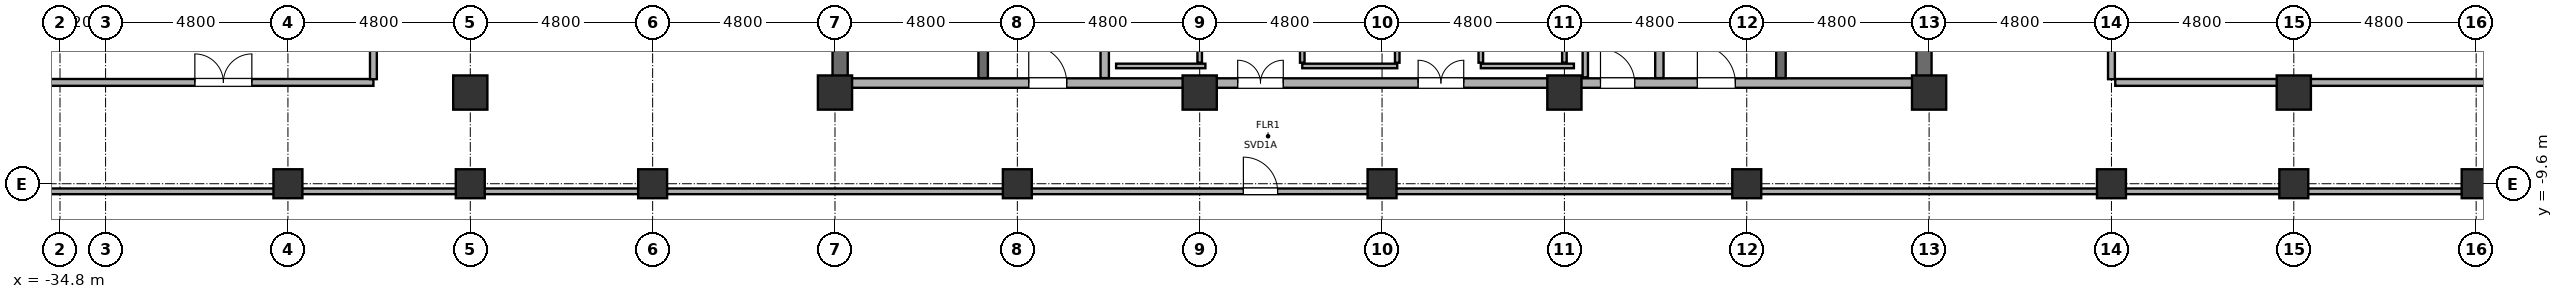
"""IFC4 building model, lengths in metres.
Left out: names, types, materials, properties, quantities, classifications, styles, units other than length and angle.
Written with IfcOpenShell. Run it as: python <this file> out.ifc"""

import sys

from ifc_helpers import new_model, si_unit, direction, frame, frame_2d, origin, origin_2d, place, context, subcontext, project, spatial, rectangle, hollow_rectangle, hollow_circle, extrude, element, fill, save


model = new_model("IFC4")
c1 = context("Model", 3, precision=1e-05, world=origin(), true_north=direction((0.0, 1.0)))
c2 = subcontext(c1, "Body", "Model", "MODEL_VIEW")
j1 = project(units=[si_unit("LENGTHUNIT", "METRE"), si_unit("PLANEANGLEUNIT", "RADIAN")], contexts=[c1])
p1 = place(None, origin())
s1 = spatial("IfcSite", under=j1, at=p1, CompositionType="ELEMENT")
p2 = place(p1, origin())
s2 = spatial("IfcBuilding", under=s1, at=p2, CompositionType="ELEMENT")
p3 = place(p2, frame((0.0, 0.0, -10.2)))
s3 = spatial("IfcBuildingStorey", under=s2, at=p3, CompositionType="ELEMENT", Elevation=-10.2)
for number, where, z_axis, x_axis in (
    (1, (-28.8, -9.6, -0.25), (0.0, 0.0, 1.0), (1.0, 0.0, 0.0)),
    (2, (-24.0, -9.6, -0.25), (0.0, 0.0, 1.0), (1.0, 0.0, 0.0)),
):
    element("IfcColumn", number, at=place(p3, frame(where, z_axis=z_axis, x_axis=x_axis)), inside=s3, PredefinedType="COLUMN", context=c2, shape_type="SweptSolid", body=[
        extrude(hollow_circle(Radius=0.381, WallThickness=0.032, at=origin_2d()), origin(), (0.0, 0.0, 1.0), 5.05),
    ])
p4 = place(p3, frame((-24.0, -7.2, -0.25), z_axis=(0.0, 0.0, 1.0), x_axis=(1.0, 0.0, 0.0)))
e3 = element("IfcColumn", 3, at=p4, inside=s3, PredefinedType="COLUMN", context=c2, shape_type="SweptSolid", body=[
    extrude(hollow_rectangle(XDim=0.9, YDim=0.9, WallThickness=0.04, at=origin_2d()), origin(), (0.0, 0.0, 1.0), 5.05),
])
p5 = place(p3, frame((-19.2, -9.6, -0.25), z_axis=(0.0, 0.0, 1.0), x_axis=(1.0, 0.0, 0.0)))
e4 = element("IfcColumn", 4, at=p5, inside=s3, PredefinedType="COLUMN", context=c2, shape_type="SweptSolid", body=[
    extrude(hollow_circle(Radius=0.381, WallThickness=0.032, at=origin_2d()), origin(), (0.0, 0.0, 1.0), 5.05),
])
p6 = place(p3, frame((-14.4, -7.2, -0.25), z_axis=(0.0, 0.0, 1.0), x_axis=(1.0, 0.0, 0.0)))
e5 = element("IfcColumn", 5, at=p6, inside=s3, PredefinedType="COLUMN", context=c2, shape_type="SweptSolid", body=[
    extrude(hollow_rectangle(XDim=0.9, YDim=0.9, WallThickness=0.04, at=origin_2d()), origin(), (0.0, 0.0, 1.0), 5.05),
])
p7 = place(p3, frame((-9.6, -9.6, -0.25), z_axis=(0.0, 0.0, 1.0), x_axis=(1.0, 0.0, 0.0)))
e6 = element("IfcColumn", 6, at=p7, inside=s3, PredefinedType="COLUMN", context=c2, shape_type="SweptSolid", body=[
    extrude(hollow_circle(Radius=0.381, WallThickness=0.032, at=origin_2d()), origin(), (0.0, 0.0, 1.0), 5.05),
])
p8 = place(p3, frame((-4.8, -7.2, -0.25), z_axis=(0.0, 0.0, 1.0), x_axis=(1.0, 0.0, 0.0)))
e7 = element("IfcColumn", 7, at=p8, inside=s3, PredefinedType="COLUMN", context=c2, shape_type="SweptSolid", body=[
    extrude(hollow_rectangle(XDim=0.9, YDim=0.9, WallThickness=0.04, at=origin_2d()), origin(), (0.0, 0.0, 1.0), 5.05),
])
p9 = place(p3, frame((0.0, -9.6, -0.25), z_axis=(0.0, 0.0, 1.0), x_axis=(1.0, 0.0, 0.0)))
e8 = element("IfcColumn", 8, at=p9, inside=s3, PredefinedType="COLUMN", context=c2, shape_type="SweptSolid", body=[
    extrude(hollow_circle(Radius=0.381, WallThickness=0.032, at=origin_2d()), origin(), (0.0, 0.0, 1.0), 5.05),
])
p10 = place(p3, frame((4.8, -7.2, -0.25), z_axis=(0.0, 0.0, 1.0), x_axis=(1.0, 0.0, 0.0)))
e9 = element("IfcColumn", 9, at=p10, inside=s3, PredefinedType="COLUMN", context=c2, shape_type="SweptSolid", body=[
    extrude(hollow_rectangle(XDim=0.9, YDim=0.9, WallThickness=0.04, at=origin_2d()), origin(), (0.0, 0.0, 1.0), 5.05),
])
p11 = place(p3, frame((9.6, -9.6, -0.25), z_axis=(0.0, 0.0, 1.0), x_axis=(1.0, 0.0, 0.0)))
e10 = element("IfcColumn", 10, at=p11, inside=s3, PredefinedType="COLUMN", context=c2, shape_type="SweptSolid", body=[
    extrude(hollow_circle(Radius=0.381, WallThickness=0.032, at=origin_2d()), origin(), (0.0, 0.0, 1.0), 5.05),
])
p12 = place(p3, frame((14.4, -7.2, -0.25), z_axis=(0.0, 0.0, 1.0), x_axis=(1.0, 0.0, 0.0)))
e11 = element("IfcColumn", 11, at=p12, inside=s3, PredefinedType="COLUMN", context=c2, shape_type="SweptSolid", body=[
    extrude(hollow_rectangle(XDim=0.9, YDim=0.9, WallThickness=0.04, at=origin_2d()), origin(), (0.0, 0.0, 1.0), 5.05),
])
for number, where, z_axis, x_axis in (
    (12, (19.2, -9.6, -0.25), (0.0, 0.0, 1.0), (1.0, 0.0, 0.0)),
    (13, (24.0, -9.6, -0.25), (0.0, 0.0, 1.0), (1.0, 0.0, 0.0)),
):
    element("IfcColumn", number, at=place(p3, frame(where, z_axis=z_axis, x_axis=x_axis)), inside=s3, PredefinedType="COLUMN", context=c2, shape_type="SweptSolid", body=[
        extrude(hollow_circle(Radius=0.381, WallThickness=0.032, at=origin_2d()), origin(), (0.0, 0.0, 1.0), 5.05),
    ])
p13 = place(p3, frame((24.0, -7.2, -0.25), z_axis=(0.0, 0.0, 1.0), x_axis=(1.0, 0.0, 0.0)))
e14 = element("IfcColumn", 14, at=p13, inside=s3, PredefinedType="COLUMN", context=c2, shape_type="SweptSolid", body=[
    extrude(hollow_rectangle(XDim=0.9, YDim=0.9, WallThickness=0.04, at=origin_2d()), origin(), (0.0, 0.0, 1.0), 5.05),
])
p14 = place(p3, frame((28.8, -9.6, -0.25), z_axis=(0.0, 0.0, 1.0), x_axis=(1.0, 0.0, 0.0)))
e15 = element("IfcColumn", 15, at=p14, inside=s3, PredefinedType="COLUMN", context=c2, shape_type="SweptSolid", body=[
    extrude(hollow_circle(Radius=0.381, WallThickness=0.032, at=origin_2d()), origin(), (0.0, 0.0, 1.0), 5.05),
])
for number, where, z_axis, x_axis in (
    (16, (-14.265, -7.2, -0.25), (0.0, 0.0, 1.0), (0.0, 1.0, 0.0)),
    (17, (14.265, -7.2, -0.25), (0.0, 0.0, 1.0), (0.0, 1.0, 0.0)),
):
    element("IfcWall", number, at=place(p3, frame(where, z_axis=z_axis, x_axis=x_axis)), inside=s3, PredefinedType="SHEAR", context=c2, shape_type="SweptSolid", body=[
        extrude(rectangle(XDim=14.4, YDim=0.4, at=frame_2d((7.2, 0.0))), origin(), (0.0, 0.0, 1.0), 4.8),
    ])
p15 = place(p3, frame((-14.2, -6.95, 0.0), z_axis=(0.0, 0.0, 1.0), x_axis=(1.0, 0.0, 0.0)))
e18 = element("IfcWall", 18, at=p15, inside=s3, PredefinedType="SOLIDWALL", context=c2, shape_type="SweptSolid", body=[
    extrude(rectangle(XDim=9.4, YDim=0.25, at=frame_2d((4.7, 0.0))), origin(), (0.0, 0.0, 1.0), 3.55),
])
p16 = place(p15, frame((4.9, 0.0, 0.0)))
e19 = element("IfcOpeningElement", 19, at=p16, cuts=e18, PredefinedType="OPENING", context=c2, shape_type="SweptSolid", body=[
    extrude(rectangle(XDim=1.0, YDim=2.15, at=frame_2d((0.5, 1.075))), frame((0.0, 0.14, 0.0), z_axis=(0.0, -1.0, 0.0), x_axis=(1.0, 0.0, 0.0)), (0.0, 0.0, 1.0), 0.28),
])
p17 = place(p3, frame((-4.6, -6.95, 0.0), z_axis=(0.0, 0.0, 1.0), x_axis=(1.0, 0.0, 0.0)))
e20 = element("IfcWall", 20, at=p17, inside=s3, PredefinedType="SOLIDWALL", context=c2, shape_type="SweptSolid", body=[
    extrude(rectangle(XDim=9.2, YDim=0.25, at=frame_2d((4.6, 0.0))), origin(), (0.0, 0.0, 1.0), 3.35),
])
p18 = place(p17, frame((0.8, 0.0, 0.0)))
e21 = element("IfcOpeningElement", 21, at=p18, cuts=e20, PredefinedType="OPENING", context=c2, shape_type="SweptSolid", body=[
    extrude(rectangle(XDim=1.2, YDim=2.2, at=frame_2d((0.6, 1.1))), frame((0.0, 0.14, 0.0), z_axis=(0.0, -1.0, 0.0), x_axis=(1.0, 0.0, 0.0)), (0.0, 0.0, 1.0), 0.28),
])
p19 = place(p17, frame((5.55, 0.0, 0.0)))
e22 = element("IfcOpeningElement", 22, at=p19, cuts=e20, PredefinedType="OPENING", context=c2, shape_type="SweptSolid", body=[
    extrude(rectangle(XDim=1.2, YDim=2.2, at=frame_2d((0.6, 1.1))), frame((0.0, 0.14, 0.0), z_axis=(0.0, -1.0, 0.0), x_axis=(1.0, 0.0, 0.0)), (0.0, 0.0, 1.0), 0.28),
])
p20 = place(p3, frame((4.8, -6.95, 0.0), z_axis=(0.0, 0.0, 1.0), x_axis=(1.0, 0.0, 0.0)))
e23 = element("IfcWall", 23, at=p20, inside=s3, PredefinedType="SOLIDWALL", context=c2, shape_type="SweptSolid", body=[
    extrude(rectangle(XDim=9.4, YDim=0.25, at=frame_2d((4.7, 0.0))), origin(), (0.0, 0.0, 1.0), 3.55),
])
p21 = place(p20, frame((3.5, 0.0, 0.0)))
e24 = element("IfcOpeningElement", 24, at=p21, cuts=e23, PredefinedType="OPENING", context=c2, shape_type="SweptSolid", body=[
    extrude(rectangle(XDim=1.0, YDim=2.15, at=frame_2d((0.5, 1.075))), frame((0.0, 0.14, 0.0), z_axis=(0.0, -1.0, 0.0), x_axis=(1.0, 0.0, 0.0)), (0.0, 0.0, 1.0), 0.28),
])
p22 = place(p20, frame((0.95, 0.0, 0.0)))
e25 = element("IfcOpeningElement", 25, at=p22, cuts=e23, PredefinedType="OPENING", context=c2, shape_type="SweptSolid", body=[
    extrude(rectangle(XDim=0.9, YDim=2.1, at=frame_2d((0.45, 1.05))), frame((0.0, 0.14, 0.0), z_axis=(0.0, -1.0, 0.0), x_axis=(1.0, 0.0, 0.0)), (0.0, 0.0, 1.0), 0.28),
])
for number, where, z_axis, x_axis in (
    (26, (-7.3, -6.82, 0.0), (0.0, 0.0, 1.0), (0.0, 1.0, 0.0)),
    (27, (7.3, -6.82, 0.0), (0.0, 0.0, 1.0), (0.0, 1.0, 0.0)),
):
    element("IfcWall", number, at=place(p3, frame(where, z_axis=z_axis, x_axis=x_axis)), inside=s3, PredefinedType="SOLIDWALL", context=c2, shape_type="SweptSolid", body=[
        extrude(rectangle(XDim=3.67, YDim=0.22, at=frame_2d((1.835, 0.0))), origin(), (0.0, 0.0, 1.0), 3.55),
    ])
p23 = place(p3, frame((-10.5, -6.82, -0.25), z_axis=(0.0, 0.0, 1.0), x_axis=(0.0, 1.0, 0.0)))
e28 = element("IfcWall", 28, at=p23, inside=s3, PredefinedType="SOLIDWALL", context=c2, shape_type="SweptSolid", body=[
    extrude(rectangle(XDim=13.64, YDim=0.25, at=frame_2d((6.82, 0.0))), origin(), (0.0, 0.0, 1.0), 4.8),
])
p24 = place(p23, frame((2.32, 0.0, 0.25)))
e29 = element("IfcOpeningElement", 29, at=p24, cuts=e28, PredefinedType="OPENING", context=c2, shape_type="SweptSolid", body=[
    extrude(rectangle(XDim=0.95, YDim=2.15, at=frame_2d((0.475, 1.075))), frame((0.0, 0.14, 0.0), z_axis=(0.0, -1.0, 0.0), x_axis=(1.0, 0.0, 0.0)), (0.0, 0.0, 1.0), 0.28),
])
p25 = place(p3, frame((10.5, -6.82, -0.25), z_axis=(0.0, 0.0, 1.0), x_axis=(0.0, 1.0, 0.0)))
e30 = element("IfcWall", 30, at=p25, inside=s3, PredefinedType="SOLIDWALL", context=c2, shape_type="SweptSolid", body=[
    extrude(rectangle(XDim=13.64, YDim=0.25, at=frame_2d((6.82, 0.0))), origin(), (0.0, 0.0, 1.0), 4.8),
])
p26 = place(p25, frame((2.32, 0.0, 0.25)))
e31 = element("IfcOpeningElement", 31, at=p26, cuts=e30, PredefinedType="OPENING", context=c2, shape_type="SweptSolid", body=[
    extrude(rectangle(XDim=0.95, YDim=2.15, at=frame_2d((0.475, 1.075))), frame((0.0, 0.14, 0.0), z_axis=(0.0, -1.0, 0.0), x_axis=(1.0, 0.0, 0.0)), (0.0, 0.0, 1.0), 0.28),
])
p27 = place(p3, frame((-37.5, -9.8, 0.0), z_axis=(0.0, 0.0, 1.0), x_axis=(1.0, 0.0, 0.0)))
e32 = element("IfcWall", 32, at=p27, inside=s3, PredefinedType="PARTITIONING", context=c2, shape_type="SweptSolid", body=[
    extrude(rectangle(XDim=75.0, YDim=0.15, at=frame_2d((37.5, 0.0))), origin(), (0.0, 0.0, 1.0), 2.15),
])
p28 = place(p27, frame((33.85, 0.0, 0.0)))
e33 = element("IfcOpeningElement", 33, at=p28, cuts=e32, PredefinedType="OPENING", context=c2, shape_type="SweptSolid", body=[
    extrude(rectangle(XDim=0.9, YDim=2.02, at=frame_2d((0.45, 1.01))), frame((0.0, 0.09, 0.0), z_axis=(0.0, -1.0, 0.0), x_axis=(1.0, 0.0, 0.0)), (0.0, 0.0, 1.0), 0.18),
])
p29 = place(p3, frame((-37.5, -6.933, 0.0), z_axis=(0.0, 0.0, 1.0), x_axis=(1.0, 0.0, 0.0)))
e34 = element("IfcWall", 34, at=p29, inside=s3, PredefinedType="PARTITIONING", context=c2, shape_type="SweptSolid", body=[
    extrude(rectangle(XDim=10.95, YDim=0.18, at=frame_2d((5.475, 0.0))), origin(), (0.0, 0.0, 1.0), 3.85),
])
p30 = place(p29, frame((6.25, 0.0, 0.0)))
e35 = element("IfcOpeningElement", 35, at=p30, cuts=e34, PredefinedType="OPENING", context=c2, shape_type="SweptSolid", body=[
    extrude(rectangle(XDim=1.5, YDim=2.2, at=frame_2d((0.75, 1.1))), frame((0.0, 0.105, 0.0), z_axis=(0.0, -1.0, 0.0), x_axis=(1.0, 0.0, 0.0)), (0.0, 0.0, 1.0), 0.21),
])
p31 = place(p3, frame((19.3, -6.933, 0.0), z_axis=(0.0, 0.0, 1.0), x_axis=(1.0, 0.0, 0.0)))
e36 = element("IfcWall", 36, at=p31, inside=s3, PredefinedType="PARTITIONING", context=c2, shape_type="SweptSolid", body=[
    extrude(rectangle(XDim=18.2, YDim=0.18, at=frame_2d((9.1, 0.0))), origin(), (0.0, 0.0, 1.0), 3.55),
])
p32 = place(p3, frame((-7.0, -6.5, 0.0), z_axis=(0.0, 0.0, 1.0), x_axis=(1.0, 0.0, 0.0)))
e37 = element("IfcWall", 37, at=p32, inside=s3, PredefinedType="PARTITIONING", context=c2, shape_type="SweptSolid", body=[
    extrude(rectangle(XDim=2.35, YDim=0.12, at=frame_2d((1.175, 0.0))), origin(), (0.0, 0.0, 1.0), 4.55),
])
p33 = place(p3, frame((-2.1, -6.5, 0.0), z_axis=(0.0, 0.0, 1.0), x_axis=(1.0, 0.0, 0.0)))
e38 = element("IfcWall", 38, at=p33, inside=s3, PredefinedType="PARTITIONING", context=c2, shape_type="SweptSolid", body=[
    extrude(rectangle(XDim=2.5, YDim=0.12, at=frame_2d((1.25, 0.0))), origin(), (0.0, 0.0, 1.0), 4.55),
])
p34 = place(p3, frame((2.6, -6.5, 0.0), z_axis=(0.0, 0.0, 1.0), x_axis=(1.0, 0.0, 0.0)))
e39 = element("IfcWall", 39, at=p34, inside=s3, PredefinedType="PARTITIONING", context=c2, shape_type="SweptSolid", body=[
    extrude(rectangle(XDim=2.45, YDim=0.12, at=frame_2d((1.225, 0.0))), origin(), (0.0, 0.0, 1.0), 4.55),
])
p35 = place(p3, frame((-26.55, -6.848, 0.0), z_axis=(0.0, 0.0, 1.0), x_axis=(0.0, 1.0, 0.0)))
e40 = element("IfcWall", 40, at=p35, inside=s3, PredefinedType="PARTITIONING", context=c2, shape_type="SweptSolid", body=[
    extrude(rectangle(XDim=1.848, YDim=0.18, at=frame_2d((0.924, 0.0))), origin(), (0.0, 0.0, 1.0), 4.55),
])
p36 = place(p3, frame((-4.8, -6.415, 0.0), z_axis=(0.0, 0.0, 1.0), x_axis=(0.0, 1.0, 0.0)))
e41 = element("IfcWall", 41, at=p36, inside=s3, PredefinedType="PARTITIONING", context=c2, shape_type="SweptSolid", body=[
    extrude(rectangle(XDim=9.28, YDim=0.12, at=frame_2d((4.64, 0.0))), origin(), (0.0, 0.0, 1.0), 4.55),
])
p37 = place(p36, frame((3.965, 0.0, 0.0)))
e42 = element("IfcOpeningElement", 42, at=p37, cuts=e41, PredefinedType="OPENING", context=c2, shape_type="SweptSolid", body=[
    extrude(rectangle(XDim=0.9, YDim=2.1, at=frame_2d((0.45, 1.05))), frame((0.0, 0.075, 0.0), z_axis=(0.0, -1.0, 0.0), x_axis=(1.0, 0.0, 0.0)), (0.0, 0.0, 1.0), 0.15),
])
p38 = place(p3, frame((-2.1, -6.415, 0.0), z_axis=(0.0, 0.0, 1.0), x_axis=(0.0, 1.0, 0.0)))
e43 = element("IfcWall", 43, at=p38, inside=s3, PredefinedType="PARTITIONING", context=c2, shape_type="SweptSolid", body=[
    extrude(rectangle(XDim=9.165, YDim=0.12, at=frame_2d((4.583, 0.0))), origin(), (0.0, 0.0, 1.0), 4.55),
])
p39 = place(p38, frame((3.965, 0.0, 0.0)))
e44 = element("IfcOpeningElement", 44, at=p39, cuts=e43, PredefinedType="OPENING", context=c2, shape_type="SweptSolid", body=[
    extrude(rectangle(XDim=0.9, YDim=2.1, at=frame_2d((0.45, 1.05))), frame((0.0, 0.075, 0.0), z_axis=(0.0, -1.0, 0.0), x_axis=(1.0, 0.0, 0.0)), (0.0, 0.0, 1.0), 0.15),
])
p40 = place(p3, frame((0.4, -6.415, 0.0), z_axis=(0.0, 0.0, 1.0), x_axis=(0.0, 1.0, 0.0)))
e45 = element("IfcWall", 45, at=p40, inside=s3, PredefinedType="PARTITIONING", context=c2, shape_type="SweptSolid", body=[
    extrude(rectangle(XDim=9.165, YDim=0.12, at=frame_2d((4.583, 0.0))), origin(), (0.0, 0.0, 1.0), 4.55),
])
p41 = place(p3, frame((2.6, -6.415, 0.0), z_axis=(0.0, 0.0, 1.0), x_axis=(0.0, 1.0, 0.0)))
e46 = element("IfcWall", 46, at=p41, inside=s3, PredefinedType="PARTITIONING", context=c2, shape_type="SweptSolid", body=[
    extrude(rectangle(XDim=9.165, YDim=0.12, at=frame_2d((4.583, 0.0))), origin(), (0.0, 0.0, 1.0), 4.55),
])
p42 = place(p41, frame((1.465, 0.0, 0.0)))
e47 = element("IfcOpeningElement", 47, at=p42, cuts=e46, PredefinedType="OPENING", context=c2, shape_type="SweptSolid", body=[
    extrude(rectangle(XDim=0.9, YDim=2.1, at=frame_2d((0.45, 1.05))), frame((0.0, 0.075, 0.0), z_axis=(0.0, -1.0, 0.0), x_axis=(1.0, 0.0, 0.0)), (0.0, 0.0, 1.0), 0.15),
])
p43 = place(p41, frame((6.465, 0.0, 0.0)))
e48 = element("IfcOpeningElement", 48, at=p43, cuts=e46, PredefinedType="OPENING", context=c2, shape_type="SweptSolid", body=[
    extrude(rectangle(XDim=0.9, YDim=2.1, at=frame_2d((0.45, 1.05))), frame((0.0, 0.075, 0.0), z_axis=(0.0, -1.0, 0.0), x_axis=(1.0, 0.0, 0.0)), (0.0, 0.0, 1.0), 0.15),
])
p44 = place(p3, frame((4.8, -6.415, 0.0), z_axis=(0.0, 0.0, 1.0), x_axis=(0.0, 1.0, 0.0)))
e49 = element("IfcWall", 49, at=p44, inside=s3, PredefinedType="PARTITIONING", context=c2, shape_type="SweptSolid", body=[
    extrude(rectangle(XDim=9.165, YDim=0.12, at=frame_2d((4.583, 0.0))), origin(), (0.0, 0.0, 1.0), 4.55),
])
p45 = place(p3, frame((5.35, -6.8, 0.0), z_axis=(0.0, 0.0, 1.0), x_axis=(0.0, 1.0, 0.0)))
e50 = element("IfcWall", 50, at=p45, inside=s3, PredefinedType="PLUMBINGWALL", context=c2, shape_type="SweptSolid", body=[
    extrude(rectangle(XDim=2.315, YDim=0.14, at=frame_2d((1.157, 0.0))), origin(), (0.0, 0.0, 1.0), 3.55),
])
p46 = place(p3, frame((19.2, -6.848, 0.0), z_axis=(0.0, 0.0, 1.0), x_axis=(0.0, 1.0, 0.0)))
e51 = element("IfcWall", 51, at=p46, inside=s3, PredefinedType="PARTITIONING", context=c2, shape_type="SweptSolid", body=[
    extrude(rectangle(XDim=13.763, YDim=0.18, at=frame_2d((6.882, 0.0))), origin(), (0.0, 0.0, 1.0), 3.55),
])
p47 = place(p16, origin())
e52 = element("IfcDoor", 52, at=p47, inside=s3, OperationType="SINGLE_SWING_RIGHT", PredefinedType="DOOR", context=c2, shape_type="SweptSolid", body=[
    extrude(rectangle(XDim=1.0, YDim=2.15, at=frame_2d((0.5, 1.075))), frame((0.0, 0.025, 0.0), z_axis=(0.0, -1.0, 0.0), x_axis=(1.0, 0.0, 0.0)), (0.0, 0.0, 1.0), 0.05),
])
fill(e19, e52)
p48 = place(p21, origin())
e53 = element("IfcDoor", 53, at=p48, inside=s3, OperationType="SINGLE_SWING_LEFT", PredefinedType="DOOR", context=c2, shape_type="SweptSolid", body=[
    extrude(rectangle(XDim=1.0, YDim=2.15, at=frame_2d((0.5, 1.075))), frame((0.0, 0.025, 0.0), z_axis=(0.0, -1.0, 0.0), x_axis=(1.0, 0.0, 0.0)), (0.0, 0.0, 1.0), 0.05),
])
fill(e24, e53)
p49 = place(p18, origin())
e54 = element("IfcDoor", 54, at=p49, inside=s3, OperationType="DOUBLE_DOOR_SINGLE_SWING", PredefinedType="DOOR", context=c2, shape_type="SweptSolid", body=[
    extrude(rectangle(XDim=1.2, YDim=2.2, at=frame_2d((0.6, 1.1))), frame((0.0, 0.025, 0.0), z_axis=(0.0, -1.0, 0.0), x_axis=(1.0, 0.0, 0.0)), (0.0, 0.0, 1.0), 0.05),
])
fill(e21, e54)
p50 = place(p19, origin())
e55 = element("IfcDoor", 55, at=p50, inside=s3, OperationType="DOUBLE_DOOR_SINGLE_SWING", PredefinedType="DOOR", context=c2, shape_type="SweptSolid", body=[
    extrude(rectangle(XDim=1.2, YDim=2.2, at=frame_2d((0.6, 1.1))), frame((0.0, 0.025, 0.0), z_axis=(0.0, -1.0, 0.0), x_axis=(1.0, 0.0, 0.0)), (0.0, 0.0, 1.0), 0.05),
])
fill(e22, e55)
p51 = place(p22, origin())
e56 = element("IfcDoor", 56, at=p51, inside=s3, OperationType="SINGLE_SWING_LEFT", PredefinedType="DOOR", context=c2, shape_type="SweptSolid", body=[
    extrude(rectangle(XDim=0.9, YDim=2.1, at=frame_2d((0.45, 1.05))), frame((0.0, 0.025, 0.0), z_axis=(0.0, -1.0, 0.0), x_axis=(1.0, 0.0, 0.0)), (0.0, 0.0, 1.0), 0.05),
])
fill(e25, e56)
p52 = place(p28, origin())
e57 = element("IfcDoor", 57, at=p52, inside=s3, OperationType="SINGLE_SWING_LEFT", PredefinedType="DOOR", context=c2, shape_type="SweptSolid", body=[
    extrude(rectangle(XDim=0.9, YDim=2.02, at=frame_2d((0.45, 1.01))), frame((0.0, 0.025, 0.0), z_axis=(0.0, -1.0, 0.0), x_axis=(1.0, 0.0, 0.0)), (0.0, 0.0, 1.0), 0.05),
])
fill(e33, e57)
p53 = place(p30, origin())
e58 = element("IfcDoor", 58, at=p53, inside=s3, OperationType="DOUBLE_DOOR_SINGLE_SWING", PredefinedType="DOOR", context=c2, shape_type="SweptSolid", body=[
    extrude(rectangle(XDim=1.5, YDim=2.2, at=frame_2d((0.75, 1.1))), frame((0.0, 0.025, 0.0), z_axis=(0.0, -1.0, 0.0), x_axis=(1.0, 0.0, 0.0)), (0.0, 0.0, 1.0), 0.05),
])
fill(e35, e58)
save(model, sys.argv[1])
